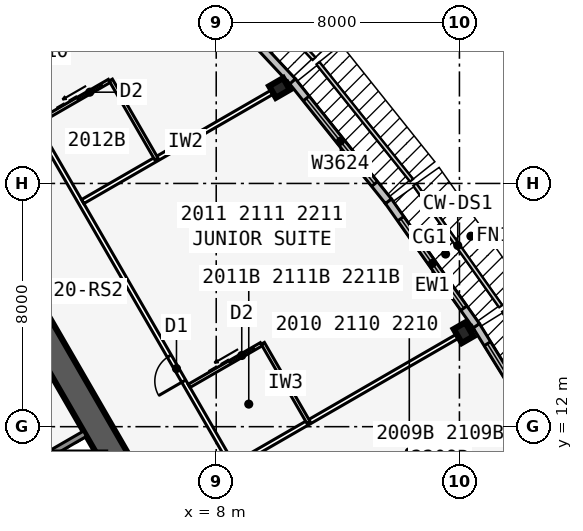
"""IFC4 building model, lengths in metres.
Left out: names, types, materials, properties, quantities, classifications, styles, units other than length and angle.
Written with IfcOpenShell. Run it as: python <this file> out.ifc"""

import sys

from ifc_helpers import new_model, si_unit, direction, frame, frame_2d, origin, origin_2d, place, context, subcontext, project, spatial, rectangle, i_section, extrude, element, fill, save


model = new_model("IFC4")
c1 = context("Model", 3, precision=1e-05, world=origin(), true_north=direction((0.0, 1.0)))
c2 = subcontext(c1, "Body", "Model", "MODEL_VIEW")
j1 = project(units=[si_unit("LENGTHUNIT", "METRE"), si_unit("PLANEANGLEUNIT", "RADIAN")], contexts=[c1])
p1 = place(None, origin())
s1 = spatial("IfcSite", under=j1, at=p1, CompositionType="ELEMENT")
p2 = place(p1, origin())
s2 = spatial("IfcBuilding", under=s1, at=p2, CompositionType="ELEMENT")
p3 = place(p2, frame((0.0, 0.0, 79.5)))
s3 = spatial("IfcBuildingStorey", under=s2, at=p3, CompositionType="ELEMENT", Elevation=79.5)
p4 = place(p3, frame((16.5, -9.526, 0.0), z_axis=(0.0, 0.0, 1.0), x_axis=(-0.499999749417, 0.866025548458, 0.0)))
e1 = element("IfcWall", 1, at=p4, inside=s3, PredefinedType="SHEAR", context=c2, shape_type="SweptSolid", body=[
    extrude(rectangle(XDim=33.0, YDim=0.9, at=frame_2d((16.5, 0.0))), origin(), (0.0, 0.0, 1.0), 3.4),
])
p5 = place(p4, frame((14.15, 0.0, 0.0)))
e2 = element("IfcOpeningElement", 2, at=p5, cuts=e1, PredefinedType="OPENING", context=c2, shape_type="SweptSolid", body=[
    extrude(rectangle(XDim=1.8, YDim=2.13, at=frame_2d((0.9, 1.065))), frame((0.0, 0.46, 0.0), z_axis=(0.0, -1.0, 0.0), x_axis=(1.0, 0.0, 0.0)), (0.0, 0.0, 1.0), 0.92),
])
p6 = place(p4, frame((12.6, 0.0, 0.0)))
e3 = element("IfcOpeningElement", 3, at=p6, cuts=e1, PredefinedType="OPENING", context=c2, shape_type="SweptSolid", body=[
    extrude(rectangle(XDim=1.0, YDim=2.13, at=frame_2d((0.5, 1.065))), frame((0.0, 0.46, 0.0), z_axis=(0.0, -1.0, 0.0), x_axis=(1.0, 0.0, 0.0)), (0.0, 0.0, 1.0), 0.92),
])
p7 = place(p3, frame((5.379, 2.586, 0.0), z_axis=(0.0, 0.0, 1.0), x_axis=(-0.500001375892, 0.866024609411, 0.0)))
e4 = element("IfcWall", 4, at=p7, inside=s3, PredefinedType="SOLIDWALL", context=c2, shape_type="SweptSolid", body=[
    extrude(rectangle(XDim=10.633, YDim=0.25, at=frame_2d((5.316, 0.0))), origin(), (0.0, 0.0, 1.0), 3.235),
])
p8 = place(p7, frame((9.164, 0.0, 0.0)))
e5 = element("IfcOpeningElement", 5, at=p8, cuts=e4, PredefinedType="OPENING", context=c2, shape_type="SweptSolid", body=[
    extrude(rectangle(XDim=0.9, YDim=2.13, at=frame_2d((0.45, 1.065))), frame((0.0, 0.135, 0.0), z_axis=(0.0, -1.0, 0.0), x_axis=(1.0, 0.0, 0.0)), (0.0, 0.0, 1.0), 0.27),
])
p9 = place(p7, frame((1.0, 0.0, 0.0)))
e6 = element("IfcOpeningElement", 6, at=p9, cuts=e4, PredefinedType="OPENING", context=c2, shape_type="SweptSolid", body=[
    extrude(rectangle(XDim=1.1, YDim=2.13, at=frame_2d((0.55, 1.065))), frame((0.0, 0.135, 0.0), z_axis=(0.0, -1.0, 0.0), x_axis=(1.0, 0.0, 0.0)), (0.0, 0.0, 1.0), 0.27),
])
p10 = place(p7, frame((3.9, 0.0, 0.0)))
e7 = element("IfcOpeningElement", 7, at=p10, cuts=e4, PredefinedType="OPENING", context=c2, shape_type="SweptSolid", body=[
    extrude(rectangle(XDim=1.1, YDim=2.13, at=frame_2d((0.55, 1.065))), frame((0.0, 0.135, 0.0), z_axis=(0.0, -1.0, 0.0), x_axis=(1.0, 0.0, 0.0)), (0.0, 0.0, 1.0), 0.27),
])
p11 = place(p7, frame((6.8, 0.0, 0.0)))
e8 = element("IfcOpeningElement", 8, at=p11, cuts=e4, PredefinedType="OPENING", context=c2, shape_type="SweptSolid", body=[
    extrude(rectangle(XDim=1.1, YDim=2.13, at=frame_2d((0.55, 1.065))), frame((0.0, 0.135, 0.0), z_axis=(0.0, -1.0, 0.0), x_axis=(1.0, 0.0, 0.0)), (0.0, 0.0, 1.0), 0.27),
])
p12 = place(p3, frame((0.979, 10.207, 0.0), z_axis=(0.0, 0.0, 1.0), x_axis=(0.866022959057, 0.500004234368, 0.0)))
e9 = element("IfcWall", 9, at=p12, inside=s3, PredefinedType="SOLIDWALL", context=c2, shape_type="SweptSolid", body=[
    extrude(rectangle(XDim=3.125, YDim=0.2, at=frame_2d((1.562, 0.0))), origin(), (0.0, 0.0, 1.0), 3.235),
])
for number, where, z_axis, x_axis in (
    (10, (16.137, 15.09, 0.0), (0.0, 0.0, 1.0), (0.866, 0.5, 0.0)),
    (11, (10.083, 23.142, 0.0), (0.0, 0.0, 1.0), (-0.5, 0.866, 0.0)),
):
    element("IfcColumn", number, at=place(p3, frame(where, z_axis=z_axis, x_axis=x_axis)), inside=s3, PredefinedType="COLUMN", context=c2, shape_type="SweptSolid", body=[
        extrude(i_section(OverallWidth=0.442, OverallDepth=0.531, WebThickness=0.066, FlangeThickness=0.106, at=origin_2d()), origin(), (0.0, 0.0, 1.0), 3.4),
    ])
p13 = place(p3, frame((19.182, 11.071, 0.0), z_axis=(0.0, 0.0, 1.0), x_axis=(-0.526132807704, 0.850402415717, 0.0)))
e12 = element("IfcWall", 12, at=p13, inside=s3, PredefinedType="STANDARD", context=c2, shape_type="SweptSolid", body=[
    extrude(rectangle(XDim=5.002, YDim=0.25, at=frame_2d((2.501, 0.0))), origin(), (0.0, 0.0, 1.0), 3.235),
])
p14 = place(p13, frame((0.701, 0.0, 0.45)))
e13 = element("IfcOpeningElement", 13, at=p14, cuts=e12, PredefinedType="OPENING", context=c2, shape_type="SweptSolid", body=[
    extrude(rectangle(XDim=3.6, YDim=2.4, at=frame_2d((1.8, 1.2))), frame((0.0, 0.135, 0.0), z_axis=(0.0, -1.0, 0.0), x_axis=(1.0, 0.0, 0.0)), (0.0, 0.0, 1.0), 0.27),
])
p15 = place(p3, frame((16.555, 15.318, 0.0), z_axis=(0.0, 0.0, 1.0), x_axis=(-0.5766431066, 0.81699616132, 0.0)))
e14 = element("IfcWall", 14, at=p15, inside=s3, PredefinedType="STANDARD", context=c2, shape_type="SweptSolid", body=[
    extrude(rectangle(XDim=5.021, YDim=0.25, at=frame_2d((2.51, 0.0))), origin(), (0.0, 0.0, 1.0), 3.235),
])
p16 = place(p15, frame((0.71, 0.0, 0.45)))
e15 = element("IfcOpeningElement", 15, at=p16, cuts=e14, PredefinedType="OPENING", context=c2, shape_type="SweptSolid", body=[
    extrude(rectangle(XDim=3.6, YDim=2.4, at=frame_2d((1.8, 1.2))), frame((0.0, 0.135, 0.0), z_axis=(0.0, -1.0, 0.0), x_axis=(1.0, 0.0, 0.0)), (0.0, 0.0, 1.0), 0.27),
])
p17 = place(p3, frame((13.664, 19.414, 0.0), z_axis=(0.0, 0.0, 1.0), x_axis=(-0.624594965756, 0.780948864364, 0.0)))
e16 = element("IfcWall", 16, at=p17, inside=s3, PredefinedType="STANDARD", context=c2, shape_type="SweptSolid", body=[
    extrude(rectangle(XDim=5.058, YDim=0.25, at=frame_2d((2.529, 0.0))), origin(), (0.0, 0.0, 1.0), 3.235),
])
p18 = place(p17, frame((0.729, 0.0, 0.45)))
e17 = element("IfcOpeningElement", 17, at=p18, cuts=e16, PredefinedType="OPENING", context=c2, shape_type="SweptSolid", body=[
    extrude(rectangle(XDim=3.6, YDim=2.4, at=frame_2d((1.8, 1.2))), frame((0.0, 0.135, 0.0), z_axis=(0.0, -1.0, 0.0), x_axis=(1.0, 0.0, 0.0)), (0.0, 0.0, 1.0), 0.27),
])
p19 = place(p3, frame((10.511, 23.357, 0.0), z_axis=(0.0, 0.0, 1.0), x_axis=(-0.682289646561, 0.731081964075, 0.0)))
e18 = element("IfcWall", 18, at=p19, inside=s3, PredefinedType="STANDARD", context=c2, shape_type="SweptSolid", body=[
    extrude(rectangle(XDim=8.211, YDim=0.25, at=frame_2d((4.105, 0.0))), origin(), (0.0, 0.0, 1.0), 3.235),
])
p20 = place(p19, frame((2.006, 0.0, 0.45)))
e19 = element("IfcOpeningElement", 19, at=p20, cuts=e18, PredefinedType="OPENING", context=c2, shape_type="SweptSolid", body=[
    extrude(rectangle(XDim=4.2, YDim=2.4, at=frame_2d((2.1, 1.2))), frame((0.0, 0.135, 0.0), z_axis=(0.0, -1.0, 0.0), x_axis=(1.0, 0.0, 0.0)), (0.0, 0.0, 1.0), 0.27),
])
p21 = place(p3, frame((21.586, -11.885, 0.0), z_axis=(0.0, 0.0, 1.0), x_axis=(-0.500001915564, 0.86602429783, 0.0)))
e20 = element("IfcWall", 20, at=p21, inside=s3, PredefinedType="PARTITIONING", context=c2, shape_type="SweptSolid", body=[
    extrude(rectangle(XDim=42.172, YDim=0.15, at=frame_2d((21.086, 0.0))), origin(), (0.0, 0.0, 1.0), 3.235),
])
p22 = place(p21, frame((1.911, 0.0, 0.0)))
e21 = element("IfcOpeningElement", 21, at=p22, cuts=e20, PredefinedType="OPENING", context=c2, shape_type="SweptSolid", body=[
    extrude(rectangle(XDim=0.95, YDim=2.13, at=frame_2d((0.475, 1.065))), frame((0.0, 0.085, 0.0), z_axis=(0.0, -1.0, 0.0), x_axis=(1.0, 0.0, 0.0)), (0.0, 0.0, 1.0), 0.17),
])
p23 = place(p21, frame((8.711, 0.0, 0.0)))
e22 = element("IfcOpeningElement", 22, at=p23, cuts=e20, PredefinedType="OPENING", context=c2, shape_type="SweptSolid", body=[
    extrude(rectangle(XDim=0.95, YDim=2.13, at=frame_2d((0.475, 1.065))), frame((0.0, 0.085, 0.0), z_axis=(0.0, -1.0, 0.0), x_axis=(1.0, 0.0, 0.0)), (0.0, 0.0, 1.0), 0.17),
])
p24 = place(p21, frame((13.111, 0.0, 0.0)))
e23 = element("IfcOpeningElement", 23, at=p24, cuts=e20, PredefinedType="OPENING", context=c2, shape_type="SweptSolid", body=[
    extrude(rectangle(XDim=0.95, YDim=2.13, at=frame_2d((0.475, 1.065))), frame((0.0, 0.085, 0.0), z_axis=(0.0, -1.0, 0.0), x_axis=(1.0, 0.0, 0.0)), (0.0, 0.0, 1.0), 0.17),
])
p25 = place(p21, frame((23.711, 0.0, 0.0)))
e24 = element("IfcOpeningElement", 24, at=p25, cuts=e20, PredefinedType="OPENING", context=c2, shape_type="SweptSolid", body=[
    extrude(rectangle(XDim=0.95, YDim=2.13, at=frame_2d((0.475, 1.065))), frame((0.0, 0.085, 0.0), z_axis=(0.0, -1.0, 0.0), x_axis=(1.0, 0.0, 0.0)), (0.0, 0.0, 1.0), 0.17),
])
p26 = place(p21, frame((29.311, 0.0, 0.0)))
e25 = element("IfcOpeningElement", 25, at=p26, cuts=e20, PredefinedType="OPENING", context=c2, shape_type="SweptSolid", body=[
    extrude(rectangle(XDim=0.95, YDim=2.13, at=frame_2d((0.475, 1.065))), frame((0.0, 0.085, 0.0), z_axis=(0.0, -1.0, 0.0), x_axis=(1.0, 0.0, 0.0)), (0.0, 0.0, 1.0), 0.17),
])
p27 = place(p21, frame((39.311, 0.0, 0.0)))
e26 = element("IfcOpeningElement", 26, at=p27, cuts=e20, PredefinedType="OPENING", context=c2, shape_type="SweptSolid", body=[
    extrude(rectangle(XDim=0.95, YDim=2.13, at=frame_2d((0.475, 1.065))), frame((0.0, 0.085, 0.0), z_axis=(0.0, -1.0, 0.0), x_axis=(1.0, 0.0, 0.0)), (0.0, 0.0, 1.0), 0.17),
])
p28 = place(p3, frame((8.608, 10.743, 0.0), z_axis=(0.0, 0.0, 1.0), x_axis=(0.866028232062, 0.499995101247, 0.0)))
e27 = element("IfcWall", 27, at=p28, inside=s3, PredefinedType="PARTITIONING", context=c2, shape_type="SweptSolid", body=[
    extrude(rectangle(XDim=9.043, YDim=0.15, at=frame_2d((4.521, 0.0))), origin(), (0.0, 0.0, 1.0), 2.389),
])
p29 = place(p3, frame((3.608, 19.404, 0.0), z_axis=(0.0, 0.0, 1.0), x_axis=(0.866021300503, 0.500007107024, 0.0)))
e28 = element("IfcWall", 28, at=p29, inside=s3, PredefinedType="PARTITIONING", context=c2, shape_type="SweptSolid", body=[
    extrude(rectangle(XDim=7.82, YDim=0.15, at=frame_2d((3.91, 0.0))), origin(), (0.0, 0.0, 1.0), 2.389),
])
p30 = place(p3, frame((11.033, 12.143, 0.0), z_axis=(0.0, 0.0, 1.0), x_axis=(-0.50002537861, 0.866010750942, 0.0)))
e29 = element("IfcWall", 29, at=p30, inside=s3, PredefinedType="PLUMBINGWALL", context=c2, shape_type="SweptSolid", body=[
    extrude(rectangle(XDim=3.0, YDim=0.12, at=frame_2d((1.5, 0.0))), origin(), (0.0, 0.0, 1.0), 3.235),
])
p31 = place(p3, frame((7.108, 13.341, 0.0), z_axis=(0.0, 0.0, 1.0), x_axis=(0.866035715982, 0.499982138324, 0.0)))
e30 = element("IfcWall", 30, at=p31, inside=s3, PredefinedType="PLUMBINGWALL", context=c2, shape_type="SweptSolid", body=[
    extrude(rectangle(XDim=2.74, YDim=0.12, at=frame_2d((1.37, 0.0))), origin(), (0.0, 0.0, 1.0), 3.235),
])
p32 = place(p31, frame((1.55, 0.0, 0.0)))
e31 = element("IfcOpeningElement", 31, at=p32, cuts=e30, PredefinedType="OPENING", context=c2, shape_type="SweptSolid", body=[
    extrude(rectangle(XDim=0.9, YDim=2.13, at=frame_2d((0.45, 1.065))), frame((0.0, 0.07, 0.0), z_axis=(0.0, -1.0, 0.0), x_axis=(1.0, 0.0, 0.0)), (0.0, 0.0, 1.0), 0.14),
])
p33 = place(p3, frame((6.033, 20.803, 0.0), z_axis=(0.0, 0.0, 1.0), x_axis=(-0.499990139034, 0.866031096941, 0.0)))
e32 = element("IfcWall", 32, at=p33, inside=s3, PredefinedType="PLUMBINGWALL", context=c2, shape_type="SweptSolid", body=[
    extrude(rectangle(XDim=3.0, YDim=0.12, at=frame_2d((1.5, 0.0))), origin(), (0.0, 0.0, 1.0), 3.235),
])
p34 = place(p3, frame((2.108, 22.002, 0.0), z_axis=(0.0, 0.0, 1.0), x_axis=(0.866035715982, 0.499982138324, 0.0)))
e33 = element("IfcWall", 33, at=p34, inside=s3, PredefinedType="PLUMBINGWALL", context=c2, shape_type="SweptSolid", body=[
    extrude(rectangle(XDim=2.74, YDim=0.12, at=frame_2d((1.37, 0.0))), origin(), (0.0, 0.0, 1.0), 3.235),
])
p35 = place(p34, frame((1.55, 0.0, 0.0)))
e34 = element("IfcOpeningElement", 34, at=p35, cuts=e33, PredefinedType="OPENING", context=c2, shape_type="SweptSolid", body=[
    extrude(rectangle(XDim=0.9, YDim=2.13, at=frame_2d((0.45, 1.065))), frame((0.0, 0.07, 0.0), z_axis=(0.0, -1.0, 0.0), x_axis=(1.0, 0.0, 0.0)), (0.0, 0.0, 1.0), 0.14),
])
p36 = place(p14, origin())
e35 = element("IfcWindow", 35, at=p36, inside=s3, PartitioningType="SINGLE_PANEL", PredefinedType="WINDOW", context=c2, shape_type="SweptSolid", body=[
    extrude(rectangle(XDim=3.6, YDim=2.4, at=frame_2d((1.8, 1.2))), frame((0.0, 0.03, 0.0), z_axis=(0.0, -1.0, 0.0), x_axis=(1.0, 0.0, 0.0)), (0.0, 0.0, 1.0), 0.06),
])
fill(e13, e35)
p37 = place(p16, origin())
e36 = element("IfcWindow", 36, at=p37, inside=s3, PartitioningType="SINGLE_PANEL", PredefinedType="WINDOW", context=c2, shape_type="SweptSolid", body=[
    extrude(rectangle(XDim=3.6, YDim=2.4, at=frame_2d((1.8, 1.2))), frame((0.0, 0.03, 0.0), z_axis=(0.0, -1.0, 0.0), x_axis=(1.0, 0.0, 0.0)), (0.0, 0.0, 1.0), 0.06),
])
fill(e15, e36)
p38 = place(p18, origin())
e37 = element("IfcWindow", 37, at=p38, inside=s3, PartitioningType="SINGLE_PANEL", PredefinedType="WINDOW", context=c2, shape_type="SweptSolid", body=[
    extrude(rectangle(XDim=3.6, YDim=2.4, at=frame_2d((1.8, 1.2))), frame((0.0, 0.03, 0.0), z_axis=(0.0, -1.0, 0.0), x_axis=(1.0, 0.0, 0.0)), (0.0, 0.0, 1.0), 0.06),
])
fill(e17, e37)
p39 = place(p32, origin())
e38 = element("IfcDoor", 38, at=p39, inside=s3, OperationType="SLIDING_TO_LEFT", PredefinedType="DOOR", context=c2, shape_type="SweptSolid", body=[
    extrude(rectangle(XDim=0.9, YDim=2.13, at=frame_2d((0.45, 1.065))), frame((0.0, 0.025, 0.0), z_axis=(0.0, -1.0, 0.0), x_axis=(1.0, 0.0, 0.0)), (0.0, 0.0, 1.0), 0.05),
])
fill(e31, e38)
p40 = place(p26, origin())
e39 = element("IfcDoor", 39, at=p40, inside=s3, OperationType="SINGLE_SWING_LEFT", PredefinedType="DOOR", context=c2, shape_type="SweptSolid", body=[
    extrude(rectangle(XDim=0.95, YDim=2.13, at=frame_2d((0.475, 1.065))), frame((0.0, 0.025, 0.0), z_axis=(0.0, -1.0, 0.0), x_axis=(1.0, 0.0, 0.0)), (0.0, 0.0, 1.0), 0.05),
])
fill(e25, e39)
p41 = place(p35, origin())
e40 = element("IfcDoor", 40, at=p41, inside=s3, OperationType="SLIDING_TO_LEFT", PredefinedType="DOOR", context=c2, shape_type="SweptSolid", body=[
    extrude(rectangle(XDim=0.9, YDim=2.13, at=frame_2d((0.45, 1.065))), frame((0.0, 0.025, 0.0), z_axis=(0.0, -1.0, 0.0), x_axis=(1.0, 0.0, 0.0)), (0.0, 0.0, 1.0), 0.05),
])
fill(e34, e40)
save(model, sys.argv[1])
